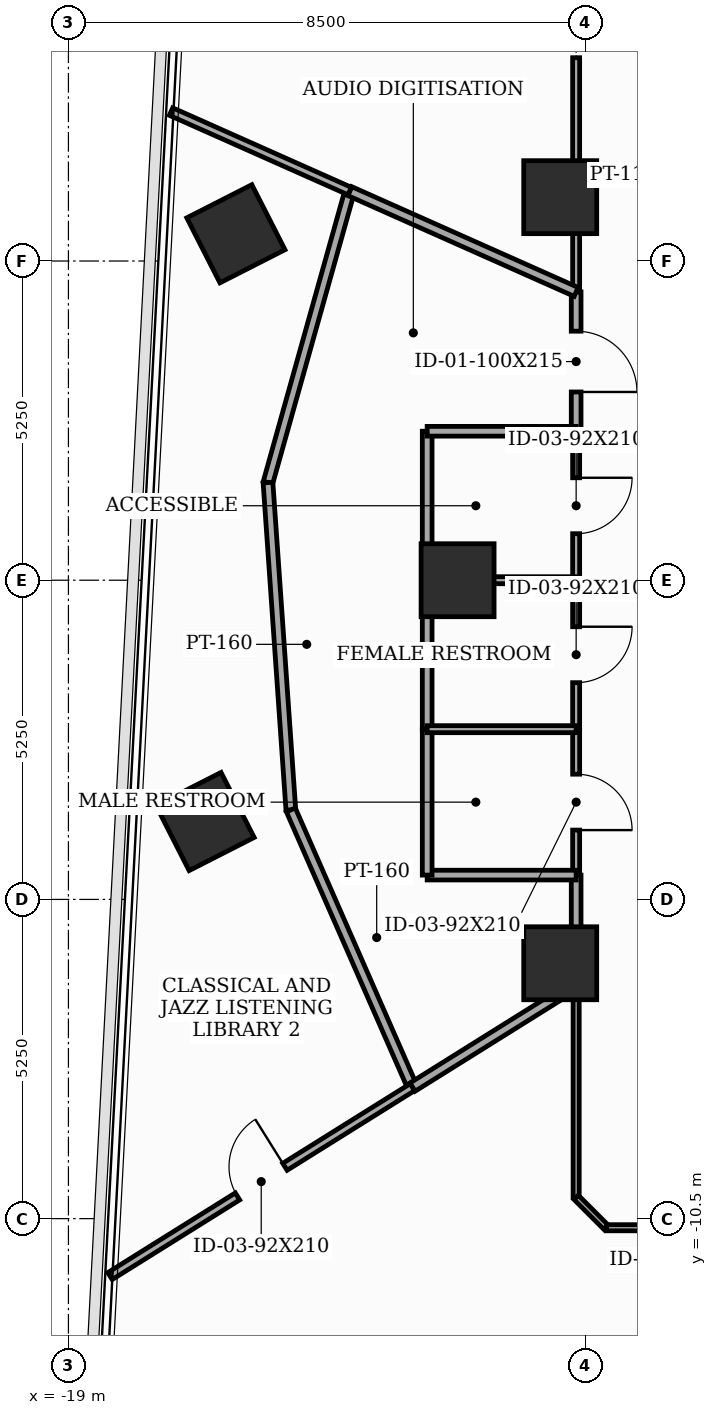
"""IFC4 building model, lengths in metres.
Left out: names, types, materials, properties, quantities, classifications, styles, units other than length and angle.
Written with IfcOpenShell. Run it as: python <this file> out.ifc"""

import sys

from ifc_helpers import new_model, si_unit, direction, frame, frame_2d, origin, origin_2d, place, context, subcontext, project, spatial, rectangle, extrude, element, fill, save


model = new_model("IFC4")
c1 = context("Model", 3, precision=1e-05, world=origin(), true_north=direction((0.0, 1.0)))
c2 = subcontext(c1, "Body", "Model", "MODEL_VIEW")
j1 = project(units=[si_unit("LENGTHUNIT", "METRE"), si_unit("PLANEANGLEUNIT", "RADIAN")], contexts=[c1])
p1 = place(None, origin())
s1 = spatial("IfcSite", under=j1, at=p1, CompositionType="ELEMENT")
p2 = place(p1, origin())
s2 = spatial("IfcBuilding", under=s1, at=p2, CompositionType="ELEMENT")
p3 = place(p2, frame((0.0, 0.0, 134.7)))
s3 = spatial("IfcBuildingStorey", under=s2, at=p3, CompositionType="ELEMENT", Elevation=134.7)
for number, where, z_axis, x_axis in (
    (1, (-10.912, 6.3, 0.0), (0.0, 0.0, 1.0), (1.0, 0.0, 0.0)),
    (2, (-12.6, 0.0, 0.0), (0.0, 0.0, 1.0), (1.0, 0.0, 0.0)),
    (3, (-10.912, -6.3, 0.0), (0.0, 0.0, 1.0), (1.0, 0.0, 0.0)),
    (4, (-16.246, 5.698, 0.0), (0.0, 0.0, 1.0), (0.891, 0.454, 0.0)),
    (5, (-16.752, -3.969, 0.0), (0.0, 0.0, 1.0), (0.891, 0.454, 0.0)),
):
    element("IfcColumn", number, at=place(p3, frame(where, z_axis=z_axis, x_axis=x_axis)), inside=s3, PredefinedType="COLUMN", context=c2, shape_type="SweptSolid", body=[
        extrude(rectangle(XDim=1.2, YDim=1.2, at=origin_2d()), origin(), (0.0, 0.0, 1.0), 3.7),
    ])
p4 = place(p3, frame((-10.65, -4.85, 0.0), z_axis=(0.0, 0.0, 1.0), x_axis=(0.0, -1.0, 0.0)))
e6 = element("IfcWall", 6, at=p4, inside=s3, PredefinedType="PARTITIONING", context=c2, shape_type="SweptSolid", body=[
    extrude(rectangle(XDim=1.805, YDim=0.16, at=frame_2d((0.902, 0.0))), origin(), (0.0, 0.0, 1.0), 2.785),
])
p5 = place(p3, frame((-10.65, 4.742, 0.0), z_axis=(0.0, 0.0, 1.0), x_axis=(0.0, -1.0, 0.0)))
e7 = element("IfcWall", 7, at=p5, inside=s3, PredefinedType="PARTITIONING", context=c2, shape_type="SweptSolid", body=[
    extrude(rectangle(XDim=2.292, YDim=0.16, at=frame_2d((1.146, 0.0))), origin(), (0.0, 0.0, 1.0), 3.5),
])
p6 = place(p5, frame((0.646, 0.0, 0.0)))
e8 = element("IfcOpeningElement", 8, at=p6, cuts=e7, PredefinedType="OPENING", context=c2, shape_type="SweptSolid", body=[
    extrude(rectangle(XDim=1.0, YDim=2.15, at=frame_2d((0.5, 1.075))), frame((0.0, 0.09, 0.0), z_axis=(0.0, -1.0, 0.0), x_axis=(1.0, 0.0, 0.0)), (0.0, 0.0, 1.0), 0.18),
])
p7 = place(p3, frame((-10.65, 0.0, 0.0), z_axis=(0.0, 0.0, 1.0), x_axis=(0.0, -1.0, 0.0)))
e9 = element("IfcWall", 9, at=p7, inside=s3, PredefinedType="PARTITIONING", context=c2, shape_type="SweptSolid", body=[
    extrude(rectangle(XDim=2.45, YDim=0.115, at=frame_2d((1.225, 0.0))), origin(), (0.0, 0.0, 1.0), 2.785),
])
p8 = place(p7, frame((0.765, 0.0, 0.0)))
e10 = element("IfcOpeningElement", 10, at=p8, cuts=e9, PredefinedType="OPENING", context=c2, shape_type="SweptSolid", body=[
    extrude(rectangle(XDim=0.92, YDim=2.1, at=frame_2d((0.46, 1.05))), frame((0.0, 0.067, 0.0), z_axis=(0.0, -1.0, 0.0), x_axis=(1.0, 0.0, 0.0)), (0.0, 0.0, 1.0), 0.135),
])
p9 = place(p3, frame((-10.65, -2.45, 0.0), z_axis=(0.0, 0.0, 1.0), x_axis=(0.0, -1.0, 0.0)))
e11 = element("IfcWall", 11, at=p9, inside=s3, PredefinedType="PARTITIONING", context=c2, shape_type="SweptSolid", body=[
    extrude(rectangle(XDim=2.4, YDim=0.115, at=frame_2d((1.2, 0.0))), origin(), (0.0, 0.0, 1.0), 3.5),
])
p10 = place(p9, frame((0.74, 0.0, 0.0)))
e12 = element("IfcOpeningElement", 12, at=p10, cuts=e11, PredefinedType="OPENING", context=c2, shape_type="SweptSolid", body=[
    extrude(rectangle(XDim=0.92, YDim=2.1, at=frame_2d((0.46, 1.05))), frame((0.0, 0.067, 0.0), z_axis=(0.0, -1.0, 0.0), x_axis=(1.0, 0.0, 0.0)), (0.0, 0.0, 1.0), 0.135),
])
p11 = place(p3, frame((-10.65, -6.655, 0.0), z_axis=(0.0, 0.0, 1.0), x_axis=(0.0, -1.0, 0.0)))
e13 = element("IfcWall", 13, at=p11, inside=s3, PredefinedType="MOVABLE", context=c2, shape_type="SweptSolid", body=[
    extrude(rectangle(XDim=3.495, YDim=0.1, at=frame_2d((1.748, 0.0))), origin(), (0.0, 0.0, 1.0), 2.785),
])
p12 = place(p3, frame((-10.65, -10.15, 0.0), z_axis=(0.0, 0.0, 1.0), x_axis=(0.707106781187, -0.707106781187, 0.0)))
e14 = element("IfcWall", 14, at=p12, inside=s3, PredefinedType="MOVABLE", context=c2, shape_type="SweptSolid", body=[
    extrude(rectangle(XDim=0.707, YDim=0.1, at=frame_2d((0.354, 0.0))), origin(), (0.0, 0.0, 1.0), 3.5),
])
p13 = place(p3, frame((-10.15, -10.65, 0.0), z_axis=(0.0, 0.0, 1.0), x_axis=(1.0, 0.0, 0.0)))
e15 = element("IfcWall", 15, at=p13, inside=s3, PredefinedType="MOVABLE", context=c2, shape_type="SweptSolid", body=[
    extrude(rectangle(XDim=5.847, YDim=0.1, at=frame_2d((2.923, 0.0))), origin(), (0.0, 0.0, 1.0), 2.785),
])
p14 = place(p13, frame((0.709, 0.0, 0.0)))
e16 = element("IfcOpeningElement", 16, at=p14, cuts=e15, PredefinedType="OPENING", context=c2, shape_type="SweptSolid", body=[
    extrude(rectangle(XDim=0.92, YDim=2.1, at=frame_2d((0.46, 1.05))), frame((0.0, 0.06, 0.0), z_axis=(0.0, -1.0, 0.0), x_axis=(1.0, 0.0, 0.0)), (0.0, 0.0, 1.0), 0.12),
])
p15 = place(p3, frame((-10.65, 10.15, 0.0), z_axis=(0.0, 0.0, 1.0), x_axis=(0.0, -1.0, 0.0)))
e17 = element("IfcWall", 17, at=p15, inside=s3, PredefinedType="PARTITIONING", context=c2, shape_type="SweptSolid", body=[
    extrude(rectangle(XDim=5.408, YDim=0.115, at=frame_2d((2.704, 0.0))), origin(), (0.0, 0.0, 1.0), 2.785),
])
p16 = place(p15, frame((0.607, 0.0, 0.0)))
e18 = element("IfcOpeningElement", 18, at=p16, cuts=e17, PredefinedType="OPENING", context=c2, shape_type="SweptSolid", body=[
    extrude(rectangle(XDim=0.95, YDim=2.1, at=frame_2d((0.475, 1.05))), frame((0.0, 0.067, 0.0), z_axis=(0.0, -1.0, 0.0), x_axis=(1.0, 0.0, 0.0)), (0.0, 0.0, 1.0), 0.135),
])
p17 = place(p3, frame((-10.65, 2.45, 0.0), z_axis=(0.0, 0.0, 1.0), x_axis=(0.0, -1.0, 0.0)))
e19 = element("IfcWall", 19, at=p17, inside=s3, PredefinedType="PARTITIONING", context=c2, shape_type="SweptSolid", body=[
    extrude(rectangle(XDim=2.45, YDim=0.115, at=frame_2d((1.225, 0.0))), origin(), (0.0, 0.0, 1.0), 2.785),
])
p18 = place(p17, frame((0.765, 0.0, 0.0)))
e20 = element("IfcOpeningElement", 20, at=p18, cuts=e19, PredefinedType="OPENING", context=c2, shape_type="SweptSolid", body=[
    extrude(rectangle(XDim=0.92, YDim=2.1, at=frame_2d((0.46, 1.05))), frame((0.0, 0.067, 0.0), z_axis=(0.0, -1.0, 0.0), x_axis=(1.0, 0.0, 0.0)), (0.0, 0.0, 1.0), 0.135),
])
p19 = place(p3, frame((-13.1, -2.45, 0.0), z_axis=(0.0, 0.0, 1.0), x_axis=(0.0, 1.0, 0.0)))
e21 = element("IfcWall", 21, at=p19, inside=s3, PredefinedType="PARTITIONING", context=c2, shape_type="SweptSolid", body=[
    extrude(rectangle(XDim=2.45, YDim=0.16, at=frame_2d((1.225, 0.0))), origin(), (0.0, 0.0, 1.0), 2.885),
])
p20 = place(p3, frame((-14.374, 6.4, 0.0), z_axis=(0.0, 0.0, 1.0), x_axis=(-0.269944572541, -0.962875863108, 0.0)))
e22 = element("IfcWall", 22, at=p20, inside=s3, PredefinedType="PARTITIONING", context=c2, shape_type="SweptSolid", body=[
    extrude(rectangle(XDim=4.979, YDim=0.16, at=frame_2d((2.489, 0.0))), origin(), (0.0, 0.0, 1.0), 2.885),
])
p21 = place(p3, frame((-15.718, 1.606, 0.0), z_axis=(0.0, 0.0, 1.0), x_axis=(0.069662122655, -0.997570643447, 0.0)))
e23 = element("IfcWall", 23, at=p21, inside=s3, PredefinedType="PARTITIONING", context=c2, shape_type="SweptSolid", body=[
    extrude(rectangle(XDim=5.397, YDim=0.16, at=frame_2d((2.699, 0.0))), origin(), (0.0, 0.0, 1.0), 2.885),
])
p22 = place(p3, frame((-15.342, -3.778, 0.0), z_axis=(0.0, 0.0, 1.0), x_axis=(0.401510696769, -0.915854333604, 0.0)))
e24 = element("IfcWall", 24, at=p22, inside=s3, PredefinedType="PARTITIONING", context=c2, shape_type="SweptSolid", body=[
    extrude(rectangle(XDim=4.979, YDim=0.16, at=frame_2d((2.489, 0.0))), origin(), (0.0, 0.0, 1.0), 3.125),
])
p23 = place(p3, frame((-10.65, -4.85, 0.0), z_axis=(0.0, 0.0, 1.0), x_axis=(-1.0, 0.0, 0.0)))
e25 = element("IfcWall", 25, at=p23, inside=s3, PredefinedType="PARTITIONING", context=c2, shape_type="SweptSolid", body=[
    extrude(rectangle(XDim=2.45, YDim=0.16, at=frame_2d((1.225, 0.0))), origin(), (0.0, 0.0, 1.0), 2.785),
])
p24 = place(p3, frame((-13.1, -4.85, 0.0), z_axis=(0.0, 0.0, 1.0), x_axis=(0.0, 1.0, 0.0)))
e26 = element("IfcWall", 26, at=p24, inside=s3, PredefinedType="PARTITIONING", context=c2, shape_type="SweptSolid", body=[
    extrude(rectangle(XDim=2.4, YDim=0.16, at=frame_2d((1.2, 0.0))), origin(), (0.0, 0.0, 1.0), 3.5),
])
p25 = place(p3, frame((-13.343, -8.338, 0.0), z_axis=(0.0, 0.0, 1.0), x_axis=(0.848045809732, 0.52992292326, 0.0)))
e27 = element("IfcWall", 27, at=p25, inside=s3, PredefinedType="PARTITIONING", context=c2, shape_type="SweptSolid", body=[
    extrude(rectangle(XDim=3.176, YDim=0.16, at=frame_2d((1.588, 0.0))), origin(), (0.0, 0.0, 1.0), 2.785),
])
p26 = place(p3, frame((-10.65, 4.742, 0.0), z_axis=(0.0, 0.0, 1.0), x_axis=(-0.913556992648, 0.406710734042, 0.0)))
e28 = element("IfcWall", 28, at=p26, inside=s3, PredefinedType="PARTITIONING", context=c2, shape_type="SweptSolid", body=[
    extrude(rectangle(XDim=4.076, YDim=0.16, at=frame_2d((2.038, 0.0))), origin(), (0.0, 0.0, 1.0), 2.785),
])
p27 = place(p3, frame((-13.1, 0.0, 0.0), z_axis=(0.0, 0.0, 1.0), x_axis=(0.0, 1.0, 0.0)))
e29 = element("IfcWall", 29, at=p27, inside=s3, PredefinedType="PARTITIONING", context=c2, shape_type="SweptSolid", body=[
    extrude(rectangle(XDim=2.45, YDim=0.16, at=frame_2d((1.225, 0.0))), origin(), (0.0, 0.0, 1.0), 3.5),
])
p28 = place(p3, frame((-13.1, 2.45, 0.0), z_axis=(0.0, 0.0, 1.0), x_axis=(1.0, 0.0, 0.0)))
e30 = element("IfcWall", 30, at=p28, inside=s3, PredefinedType="PARTITIONING", context=c2, shape_type="SweptSolid", body=[
    extrude(rectangle(XDim=2.45, YDim=0.16, at=frame_2d((1.225, 0.0))), origin(), (0.0, 0.0, 1.0), 2.785),
])
for number, where, z_axis, x_axis in (
    (31, (-13.1, -2.45, 0.0), (0.0, 0.0, 1.0), (1.0, 0.0, 0.0)),
    (32, (-10.65, 0.0, 0.0), (0.0, 0.0, 1.0), (-1.0, 0.0, 0.0)),
):
    element("IfcWall", number, at=place(p3, frame(where, z_axis=z_axis, x_axis=x_axis)), inside=s3, PredefinedType="PARTITIONING", context=c2, shape_type="SweptSolid", body=[
        extrude(rectangle(XDim=2.45, YDim=0.115, at=frame_2d((1.225, 0.0))), origin(), (0.0, 0.0, 1.0), 2.785),
    ])
p29 = place(p3, frame((-18.316, -11.445, 0.0), z_axis=(0.0, 0.0, 1.0), x_axis=(0.848103549297, 0.529830510324, 0.0)))
e33 = element("IfcWall", 33, at=p29, inside=s3, PredefinedType="PARTITIONING", context=c2, shape_type="SweptSolid", body=[
    extrude(rectangle(XDim=5.864, YDim=0.135, at=frame_2d((2.932, 0.0))), origin(), (0.0, 0.0, 1.0), 2.985),
])
p30 = place(p29, frame((2.472, 0.0, 0.0)))
e34 = element("IfcOpeningElement", 34, at=p30, cuts=e33, PredefinedType="OPENING", context=c2, shape_type="SweptSolid", body=[
    extrude(rectangle(XDim=0.92, YDim=2.1, at=frame_2d((0.46, 1.05))), frame((0.0, 0.077, 0.0), z_axis=(0.0, -1.0, 0.0), x_axis=(1.0, 0.0, 0.0)), (0.0, 0.0, 1.0), 0.155),
])
p31 = place(p3, frame((-14.374, 6.4, 0.0), z_axis=(0.0, 0.0, 1.0), x_axis=(-0.913611090133, 0.406589198068, 0.0)))
e35 = element("IfcWall", 35, at=p31, inside=s3, PredefinedType="PARTITIONING", context=c2, shape_type="SweptSolid", body=[
    extrude(rectangle(XDim=3.216, YDim=0.135, at=frame_2d((1.608, 0.0))), origin(), (0.0, 0.0, 1.0), 2.985),
])
p32 = place(p3, frame((-10.102, -25.003, 0.0), z_axis=(0.0, 0.0, 1.0), x_axis=(0.374591600556, 0.927189911935, 0.0)))
e36 = element("IfcWall", 36, at=p32, inside=s3, PredefinedType="MOVABLE", context=c2, shape_type="SweptSolid", body=[
    extrude(rectangle(XDim=15.48, YDim=0.1, at=frame_2d((7.74, 0.0))), origin(), (0.0, 0.0, 1.0), 2.785),
])
p33 = place(p6, origin())
e37 = element("IfcDoor", 37, at=p33, inside=s3, OperationType="SINGLE_SWING_RIGHT", PredefinedType="DOOR", context=c2, shape_type="SweptSolid", body=[
    extrude(rectangle(XDim=1.0, YDim=2.15, at=frame_2d((0.5, 1.075))), frame((0.0, 0.025, 0.0), z_axis=(0.0, -1.0, 0.0), x_axis=(1.0, 0.0, 0.0)), (0.0, 0.0, 1.0), 0.05),
])
fill(e8, e37)
p34 = place(p8, origin())
e38 = element("IfcDoor", 38, at=p34, inside=s3, OperationType="SINGLE_SWING_LEFT", PredefinedType="DOOR", context=c2, shape_type="SweptSolid", body=[
    extrude(rectangle(XDim=0.92, YDim=2.1, at=frame_2d((0.46, 1.05))), frame((0.0, 0.025, 0.0), z_axis=(0.0, -1.0, 0.0), x_axis=(1.0, 0.0, 0.0)), (0.0, 0.0, 1.0), 0.05),
])
fill(e10, e38)
p35 = place(p10, origin())
e39 = element("IfcDoor", 39, at=p35, inside=s3, OperationType="SINGLE_SWING_RIGHT", PredefinedType="DOOR", context=c2, shape_type="SweptSolid", body=[
    extrude(rectangle(XDim=0.92, YDim=2.1, at=frame_2d((0.46, 1.05))), frame((0.0, 0.025, 0.0), z_axis=(0.0, -1.0, 0.0), x_axis=(1.0, 0.0, 0.0)), (0.0, 0.0, 1.0), 0.05),
])
fill(e12, e39)
p36 = place(p16, origin())
e40 = element("IfcDoor", 40, at=p36, inside=s3, OperationType="SLIDING_TO_LEFT", PredefinedType="DOOR", context=c2, shape_type="SweptSolid", body=[
    extrude(rectangle(XDim=0.95, YDim=2.1, at=frame_2d((0.475, 1.05))), frame((0.0, 0.025, 0.0), z_axis=(0.0, -1.0, 0.0), x_axis=(1.0, 0.0, 0.0)), (0.0, 0.0, 1.0), 0.05),
])
fill(e18, e40)
p37 = place(p18, origin())
e41 = element("IfcDoor", 41, at=p37, inside=s3, OperationType="SINGLE_SWING_LEFT", PredefinedType="DOOR", context=c2, shape_type="SweptSolid", body=[
    extrude(rectangle(XDim=0.92, YDim=2.1, at=frame_2d((0.46, 1.05))), frame((0.0, 0.025, 0.0), z_axis=(0.0, -1.0, 0.0), x_axis=(1.0, 0.0, 0.0)), (0.0, 0.0, 1.0), 0.05),
])
fill(e20, e41)
p38 = place(p30, origin())
e42 = element("IfcDoor", 42, at=p38, inside=s3, OperationType="SINGLE_SWING_RIGHT", PredefinedType="DOOR", context=c2, shape_type="SweptSolid", body=[
    extrude(rectangle(XDim=0.92, YDim=2.1, at=frame_2d((0.46, 1.05))), frame((0.0, 0.025, 0.0), z_axis=(0.0, -1.0, 0.0), x_axis=(1.0, 0.0, 0.0)), (0.0, 0.0, 1.0), 0.05),
])
fill(e34, e42)
save(model, sys.argv[1])
